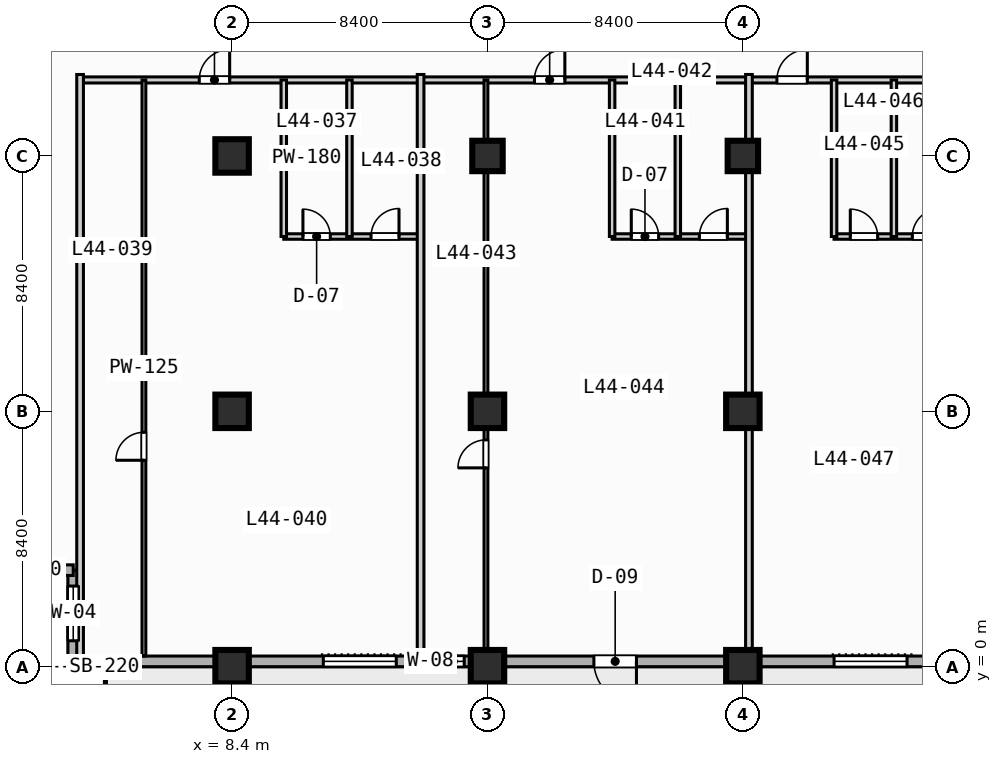
"""IFC4 building model, lengths in metres.
Left out: names, types, materials, properties, quantities, classifications, styles, units other than length and angle.
Written with IfcOpenShell. Run it as: python <this file> out.ifc"""

import sys

from ifc_helpers import new_model, si_unit, direction, frame, frame_2d, origin, origin_2d, place, context, subcontext, project, spatial, rectangle, extrude, element, fill, save


model = new_model("IFC4")
c1 = context("Model", 3, precision=1e-05, world=origin(), true_north=direction((0.0, 1.0)))
c2 = subcontext(c1, "Body", "Model", "MODEL_VIEW")
j1 = project(units=[si_unit("LENGTHUNIT", "METRE"), si_unit("PLANEANGLEUNIT", "RADIAN")], contexts=[c1])
p1 = place(None, origin())
s1 = spatial("IfcSite", under=j1, at=p1, CompositionType="ELEMENT")
p2 = place(p1, origin())
s2 = spatial("IfcBuilding", under=s1, at=p2, CompositionType="ELEMENT")
p3 = place(p2, frame((0.0, 0.0, 182.8)))
s3 = spatial("IfcBuildingStorey", under=s2, at=p3, CompositionType="ELEMENT", Elevation=182.8)
for number, where, z_axis, x_axis in (
    (1, (8.4, 0.0, 0.0), (0.0, 0.0, 1.0), (1.0, 0.0, 0.0)),
    (2, (8.4, 8.4, 0.0), (0.0, 0.0, 1.0), (1.0, 0.0, 0.0)),
    (3, (8.4, 16.8, 0.0), (0.0, 0.0, 1.0), (1.0, 0.0, 0.0)),
    (4, (16.8, 0.0, 0.0), (0.0, 0.0, 1.0), (1.0, 0.0, 0.0)),
    (5, (16.8, 8.4, 0.0), (0.0, 0.0, 1.0), (1.0, 0.0, 0.0)),
):
    element("IfcColumn", number, at=place(p3, frame(where, z_axis=z_axis, x_axis=x_axis)), inside=s3, PredefinedType="COLUMN", context=c2, shape_type="SweptSolid", body=[
        extrude(rectangle(XDim=1.1, YDim=1.1, at=origin_2d()), origin(), (0.0, 0.0, 1.0), 3.7),
    ])
p4 = place(p3, frame((16.8, 16.8, 0.0), z_axis=(0.0, 0.0, 1.0), x_axis=(1.0, 0.0, 0.0)))
e6 = element("IfcColumn", 6, at=p4, inside=s3, PredefinedType="COLUMN", context=c2, shape_type="SweptSolid", body=[
    extrude(rectangle(XDim=1.0, YDim=1.0, at=origin_2d()), origin(), (0.0, 0.0, 1.0), 3.7),
])
for number, where, z_axis, x_axis in (
    (7, (25.2, 0.0, 0.0), (0.0, 0.0, 1.0), (1.0, 0.0, 0.0)),
    (8, (25.2, 8.4, 0.0), (0.0, 0.0, 1.0), (1.0, 0.0, 0.0)),
):
    element("IfcColumn", number, at=place(p3, frame(where, z_axis=z_axis, x_axis=x_axis)), inside=s3, PredefinedType="COLUMN", context=c2, shape_type="SweptSolid", body=[
        extrude(rectangle(XDim=1.1, YDim=1.1, at=origin_2d()), origin(), (0.0, 0.0, 1.0), 3.7),
    ])
p5 = place(p3, frame((25.2, 16.8, 0.0), z_axis=(0.0, 0.0, 1.0), x_axis=(1.0, 0.0, 0.0)))
e9 = element("IfcColumn", 9, at=p5, inside=s3, PredefinedType="COLUMN", context=c2, shape_type="SweptSolid", body=[
    extrude(rectangle(XDim=1.0, YDim=1.0, at=origin_2d()), origin(), (0.0, 0.0, 1.0), 3.7),
])
p6 = place(p3, frame((3.175, 0.175, 0.0), z_axis=(0.0, 0.0, 1.0), x_axis=(0.0, 1.0, 0.0)))
e10 = element("IfcWall", 10, at=p6, inside=s3, PredefinedType="STANDARD", context=c2, shape_type="SweptSolid", body=[
    extrude(rectangle(XDim=3.0, YDim=0.35, at=frame_2d((1.5, 0.0))), origin(), (0.0, 0.0, 1.0), 3.47),
])
p7 = place(p6, frame((0.677, 0.0, 0.85)))
e11 = element("IfcOpeningElement", 11, at=p7, cuts=e10, PredefinedType="OPENING", context=c2, shape_type="SweptSolid", body=[
    extrude(rectangle(XDim=1.8, YDim=1.8, at=frame_2d((0.9, 0.9))), frame((0.0, 0.185, 0.0), z_axis=(0.0, -1.0, 0.0), x_axis=(1.0, 0.0, 0.0)), (0.0, 0.0, 1.0), 0.37),
])
p8 = place(p3, frame((3.175, 3.175, 0.0), z_axis=(0.0, 0.0, 1.0), x_axis=(-1.0, 0.0, 0.0)))
e12 = element("IfcWall", 12, at=p8, inside=s3, PredefinedType="STANDARD", context=c2, shape_type="SweptSolid", body=[
    extrude(rectangle(XDim=3.0, YDim=0.35, at=frame_2d((1.5, 0.0))), origin(), (0.0, 0.0, 1.0), 3.47),
])
p9 = place(p3, frame((72.425, 0.175, 0.0), z_axis=(0.0, 0.0, 1.0), x_axis=(-1.0, 0.0, 0.0)))
e13 = element("IfcWall", 13, at=p9, inside=s3, PredefinedType="STANDARD", context=c2, shape_type="SweptSolid", body=[
    extrude(rectangle(XDim=69.25, YDim=0.35, at=frame_2d((34.625, 0.0))), origin(), (0.0, 0.0, 1.0), 3.47),
])
p10 = place(p9, frame((50.725, 0.0, 0.0)))
e14 = element("IfcOpeningElement", 14, at=p10, cuts=e13, PredefinedType="OPENING", context=c2, shape_type="SweptSolid", body=[
    extrude(rectangle(XDim=1.4, YDim=2.2, at=frame_2d((0.7, 1.1))), frame((0.0, 0.185, 0.0), z_axis=(0.0, -1.0, 0.0), x_axis=(1.0, 0.0, 0.0)), (0.0, 0.0, 1.0), 0.37),
])
p11 = place(p9, frame((58.625, 0.0, 0.85)))
e15 = element("IfcOpeningElement", 15, at=p11, cuts=e13, PredefinedType="OPENING", context=c2, shape_type="SweptSolid", body=[
    extrude(rectangle(XDim=2.4, YDim=1.95, at=frame_2d((1.2, 0.975))), frame((0.0, 0.185, 0.0), z_axis=(0.0, -1.0, 0.0), x_axis=(1.0, 0.0, 0.0)), (0.0, 0.0, 1.0), 0.37),
])
p12 = place(p9, frame((41.825, 0.0, 0.85)))
e16 = element("IfcOpeningElement", 16, at=p12, cuts=e13, PredefinedType="OPENING", context=c2, shape_type="SweptSolid", body=[
    extrude(rectangle(XDim=2.4, YDim=1.95, at=frame_2d((1.2, 0.975))), frame((0.0, 0.185, 0.0), z_axis=(0.0, -1.0, 0.0), x_axis=(1.0, 0.0, 0.0)), (0.0, 0.0, 1.0), 0.37),
])
p13 = place(p9, frame((33.725, 0.0, 0.85)))
e17 = element("IfcOpeningElement", 17, at=p13, cuts=e13, PredefinedType="OPENING", context=c2, shape_type="SweptSolid", body=[
    extrude(rectangle(XDim=1.8, YDim=1.8, at=frame_2d((0.9, 0.9))), frame((0.0, 0.185, 0.0), z_axis=(0.0, -1.0, 0.0), x_axis=(1.0, 0.0, 0.0)), (0.0, 0.0, 1.0), 0.37),
])
p14 = place(p9, frame((25.025, 0.0, 0.85)))
e18 = element("IfcOpeningElement", 18, at=p14, cuts=e13, PredefinedType="OPENING", context=c2, shape_type="SweptSolid", body=[
    extrude(rectangle(XDim=2.4, YDim=1.95, at=frame_2d((1.2, 0.975))), frame((0.0, 0.185, 0.0), z_axis=(0.0, -1.0, 0.0), x_axis=(1.0, 0.0, 0.0)), (0.0, 0.0, 1.0), 0.37),
])
p15 = place(p9, frame((67.075, 0.0, 0.85)))
e19 = element("IfcOpeningElement", 19, at=p15, cuts=e13, PredefinedType="OPENING", context=c2, shape_type="SweptSolid", body=[
    extrude(rectangle(XDim=1.8, YDim=1.8, at=frame_2d((0.9, 0.9))), frame((0.0, 0.185, 0.0), z_axis=(0.0, -1.0, 0.0), x_axis=(1.0, 0.0, 0.0)), (0.0, 0.0, 1.0), 0.37),
])
p16 = place(p9, frame((56.39, 0.0, 0.85)))
e20 = element("IfcOpeningElement", 20, at=p16, cuts=e13, PredefinedType="OPENING", context=c2, shape_type="SweptSolid", body=[
    extrude(rectangle(XDim=0.72, YDim=1.8, at=frame_2d((0.36, 0.9))), frame((0.0, 0.185, 0.0), z_axis=(0.0, -1.0, 0.0), x_axis=(1.0, 0.0, 0.0)), (0.0, 0.0, 1.0), 0.37),
])
p17 = place(p9, frame((9.075, 0.0, 0.85)))
e21 = element("IfcOpeningElement", 21, at=p17, cuts=e13, PredefinedType="OPENING", context=c2, shape_type="SweptSolid", body=[
    extrude(rectangle(XDim=1.8, YDim=1.8, at=frame_2d((0.9, 0.9))), frame((0.0, 0.185, 0.0), z_axis=(0.0, -1.0, 0.0), x_axis=(1.0, 0.0, 0.0)), (0.0, 0.0, 1.0), 0.37),
])
p18 = place(p9, frame((2.675, 0.0, 0.85)))
e22 = element("IfcOpeningElement", 22, at=p18, cuts=e13, PredefinedType="OPENING", context=c2, shape_type="SweptSolid", body=[
    extrude(rectangle(XDim=1.8, YDim=1.8, at=frame_2d((0.9, 0.9))), frame((0.0, 0.185, 0.0), z_axis=(0.0, -1.0, 0.0), x_axis=(1.0, 0.0, 0.0)), (0.0, 0.0, 1.0), 0.37),
])
p19 = place(p3, frame((3.4, 19.3, 0.0), z_axis=(0.0, 0.0, 1.0), x_axis=(1.0, 0.0, 0.0)))
e23 = element("IfcWall", 23, at=p19, inside=s3, PredefinedType="PARTITIONING", context=c2, shape_type="SweptSolid", body=[
    extrude(rectangle(XDim=35.8, YDim=0.2, at=frame_2d((17.9, 0.0))), origin(), (0.0, 0.0, 1.0), 3.47),
])
p20 = place(p19, frame((3.92, 0.0, 0.0)))
e24 = element("IfcOpeningElement", 24, at=p20, cuts=e23, PredefinedType="OPENING", context=c2, shape_type="SweptSolid", body=[
    extrude(rectangle(XDim=1.0, YDim=2.15, at=frame_2d((0.5, 1.075))), frame((0.0, 0.11, 0.0), z_axis=(0.0, -1.0, 0.0), x_axis=(1.0, 0.0, 0.0)), (0.0, 0.0, 1.0), 0.22),
])
p21 = place(p19, frame((14.945, 0.0, 0.0)))
e25 = element("IfcOpeningElement", 25, at=p21, cuts=e23, PredefinedType="OPENING", context=c2, shape_type="SweptSolid", body=[
    extrude(rectangle(XDim=1.0, YDim=2.15, at=frame_2d((0.5, 1.075))), frame((0.0, 0.11, 0.0), z_axis=(0.0, -1.0, 0.0), x_axis=(1.0, 0.0, 0.0)), (0.0, 0.0, 1.0), 0.22),
])
p22 = place(p19, frame((22.92, 0.0, 0.0)))
e26 = element("IfcOpeningElement", 26, at=p22, cuts=e23, PredefinedType="OPENING", context=c2, shape_type="SweptSolid", body=[
    extrude(rectangle(XDim=1.0, YDim=2.15, at=frame_2d((0.5, 1.075))), frame((0.0, 0.11, 0.0), z_axis=(0.0, -1.0, 0.0), x_axis=(1.0, 0.0, 0.0)), (0.0, 0.0, 1.0), 0.22),
])
p23 = place(p19, frame((29.82, 0.0, 0.0)))
e27 = element("IfcOpeningElement", 27, at=p23, cuts=e23, PredefinedType="OPENING", context=c2, shape_type="SweptSolid", body=[
    extrude(rectangle(XDim=1.0, YDim=2.15, at=frame_2d((0.5, 1.075))), frame((0.0, 0.11, 0.0), z_axis=(0.0, -1.0, 0.0), x_axis=(1.0, 0.0, 0.0)), (0.0, 0.0, 1.0), 0.22),
])
p24 = place(p3, frame((3.4, 0.2, 0.0), z_axis=(0.0, 0.0, 1.0), x_axis=(0.0, 1.0, 0.0)))
e28 = element("IfcWall", 28, at=p24, inside=s3, PredefinedType="PARTITIONING", context=c2, shape_type="SweptSolid", body=[
    extrude(rectangle(XDim=19.28, YDim=0.22, at=frame_2d((9.64, 0.0))), origin(), (0.0, 0.0, 1.0), 3.47),
])
p25 = place(p3, frame((10.1, 14.15, 0.0), z_axis=(0.0, 0.0, 1.0), x_axis=(1.0, 0.0, 0.0)))
e29 = element("IfcWall", 29, at=p25, inside=s3, PredefinedType="PLUMBINGWALL", context=c2, shape_type="SweptSolid", body=[
    extrude(rectangle(XDim=4.5, YDim=0.18, at=frame_2d((2.25, 0.0))), origin(), (0.0, 0.0, 1.0), 3.47),
])
p26 = place(p25, frame((0.63, 0.0, 0.0)))
e30 = element("IfcOpeningElement", 30, at=p26, cuts=e29, PredefinedType="OPENING", context=c2, shape_type="SweptSolid", body=[
    extrude(rectangle(XDim=0.9, YDim=2.1, at=frame_2d((0.45, 1.05))), frame((0.0, 0.1, 0.0), z_axis=(0.0, -1.0, 0.0), x_axis=(1.0, 0.0, 0.0)), (0.0, 0.0, 1.0), 0.2),
])
p27 = place(p25, frame((2.87, 0.0, 0.0)))
e31 = element("IfcOpeningElement", 31, at=p27, cuts=e29, PredefinedType="OPENING", context=c2, shape_type="SweptSolid", body=[
    extrude(rectangle(XDim=0.92, YDim=2.1, at=frame_2d((0.46, 1.05))), frame((0.0, 0.1, 0.0), z_axis=(0.0, -1.0, 0.0), x_axis=(1.0, 0.0, 0.0)), (0.0, 0.0, 1.0), 0.2),
])
for number, where, z_axis, x_axis in (
    (32, (10.1, 14.15, 0.0), (0.0, 0.0, 1.0), (0.0, 1.0, 0.0)),
    (33, (12.26, 14.15, 0.0), (0.0, 0.0, 1.0), (0.0, 1.0, 0.0)),
):
    element("IfcWall", number, at=place(p3, frame(where, z_axis=z_axis, x_axis=x_axis)), inside=s3, PredefinedType="PLUMBINGWALL", context=c2, shape_type="SweptSolid", body=[
        extrude(rectangle(XDim=5.15, YDim=0.18, at=frame_2d((2.575, 0.0))), origin(), (0.0, 0.0, 1.0), 3.47),
    ])
p28 = place(p3, frame((5.5, 0.35, 0.0), z_axis=(0.0, 0.0, 1.0), x_axis=(0.0, 1.0, 0.0)))
e34 = element("IfcWall", 34, at=p28, inside=s3, PredefinedType="PARTITIONING", context=c2, shape_type="SweptSolid", body=[
    extrude(rectangle(XDim=18.95, YDim=0.125, at=frame_2d((9.475, 0.0))), origin(), (0.0, 0.0, 1.0), 3.47),
])
p29 = place(p28, frame((6.44, 0.0, 0.0)))
e35 = element("IfcOpeningElement", 35, at=p29, cuts=e34, PredefinedType="OPENING", context=c2, shape_type="SweptSolid", body=[
    extrude(rectangle(XDim=0.92, YDim=2.1, at=frame_2d((0.46, 1.05))), frame((0.0, 0.073, 0.0), z_axis=(0.0, -1.0, 0.0), x_axis=(1.0, 0.0, 0.0)), (0.0, 0.0, 1.0), 0.145),
])
p30 = place(p3, frame((14.6, 0.2, 0.0), z_axis=(0.0, 0.0, 1.0), x_axis=(0.0, 1.0, 0.0)))
e36 = element("IfcWall", 36, at=p30, inside=s3, PredefinedType="PARTITIONING", context=c2, shape_type="SweptSolid", body=[
    extrude(rectangle(XDim=19.28, YDim=0.22, at=frame_2d((9.64, 0.0))), origin(), (0.0, 0.0, 1.0), 3.47),
])
p31 = place(p3, frame((20.9, 14.15, 0.0), z_axis=(0.0, 0.0, 1.0), x_axis=(1.0, 0.0, 0.0)))
e37 = element("IfcWall", 37, at=p31, inside=s3, PredefinedType="PLUMBINGWALL", context=c2, shape_type="SweptSolid", body=[
    extrude(rectangle(XDim=4.5, YDim=0.18, at=frame_2d((2.25, 0.0))), origin(), (0.0, 0.0, 1.0), 3.47),
])
p32 = place(p31, frame((0.63, 0.0, 0.0)))
e38 = element("IfcOpeningElement", 38, at=p32, cuts=e37, PredefinedType="OPENING", context=c2, shape_type="SweptSolid", body=[
    extrude(rectangle(XDim=0.9, YDim=2.1, at=frame_2d((0.45, 1.05))), frame((0.0, 0.1, 0.0), z_axis=(0.0, -1.0, 0.0), x_axis=(1.0, 0.0, 0.0)), (0.0, 0.0, 1.0), 0.2),
])
p33 = place(p31, frame((2.87, 0.0, 0.0)))
e39 = element("IfcOpeningElement", 39, at=p33, cuts=e37, PredefinedType="OPENING", context=c2, shape_type="SweptSolid", body=[
    extrude(rectangle(XDim=0.92, YDim=2.1, at=frame_2d((0.46, 1.05))), frame((0.0, 0.1, 0.0), z_axis=(0.0, -1.0, 0.0), x_axis=(1.0, 0.0, 0.0)), (0.0, 0.0, 1.0), 0.2),
])
for number, where, z_axis, x_axis in (
    (40, (20.9, 14.15, 0.0), (0.0, 0.0, 1.0), (0.0, 1.0, 0.0)),
    (41, (23.06, 14.15, 0.0), (0.0, 0.0, 1.0), (0.0, 1.0, 0.0)),
):
    element("IfcWall", number, at=place(p3, frame(where, z_axis=z_axis, x_axis=x_axis)), inside=s3, PredefinedType="PLUMBINGWALL", context=c2, shape_type="SweptSolid", body=[
        extrude(rectangle(XDim=5.15, YDim=0.18, at=frame_2d((2.575, 0.0))), origin(), (0.0, 0.0, 1.0), 3.47),
    ])
p34 = place(p3, frame((16.75, 0.35, 0.0), z_axis=(0.0, 0.0, 1.0), x_axis=(0.0, 1.0, 0.0)))
e42 = element("IfcWall", 42, at=p34, inside=s3, PredefinedType="PARTITIONING", context=c2, shape_type="SweptSolid", body=[
    extrude(rectangle(XDim=18.95, YDim=0.125, at=frame_2d((9.475, 0.0))), origin(), (0.0, 0.0, 1.0), 2.82),
])
p35 = place(p34, frame((6.19, 0.0, 0.0)))
e43 = element("IfcOpeningElement", 43, at=p35, cuts=e42, PredefinedType="OPENING", context=c2, shape_type="SweptSolid", body=[
    extrude(rectangle(XDim=0.92, YDim=2.1, at=frame_2d((0.46, 1.05))), frame((0.0, 0.073, 0.0), z_axis=(0.0, -1.0, 0.0), x_axis=(1.0, 0.0, 0.0)), (0.0, 0.0, 1.0), 0.145),
])
p36 = place(p3, frame((25.4, 0.2, 0.0), z_axis=(0.0, 0.0, 1.0), x_axis=(0.0, 1.0, 0.0)))
e44 = element("IfcWall", 44, at=p36, inside=s3, PredefinedType="PARTITIONING", context=c2, shape_type="SweptSolid", body=[
    extrude(rectangle(XDim=19.28, YDim=0.22, at=frame_2d((9.64, 0.0))), origin(), (0.0, 0.0, 1.0), 2.82),
])
p37 = place(p3, frame((28.2, 14.15, 0.0), z_axis=(0.0, 0.0, 1.0), x_axis=(1.0, 0.0, 0.0)))
e45 = element("IfcWall", 45, at=p37, inside=s3, PredefinedType="PLUMBINGWALL", context=c2, shape_type="SweptSolid", body=[
    extrude(rectangle(XDim=4.1, YDim=0.18, at=frame_2d((2.05, 0.0))), origin(), (0.0, 0.0, 1.0), 3.47),
])
p38 = place(p37, frame((0.534, 0.0, 0.0)))
e46 = element("IfcOpeningElement", 46, at=p38, cuts=e45, PredefinedType="OPENING", context=c2, shape_type="SweptSolid", body=[
    extrude(rectangle(XDim=0.9, YDim=2.1, at=frame_2d((0.45, 1.05))), frame((0.0, 0.1, 0.0), z_axis=(0.0, -1.0, 0.0), x_axis=(1.0, 0.0, 0.0)), (0.0, 0.0, 1.0), 0.2),
])
p39 = place(p37, frame((2.574, 0.0, 0.0)))
e47 = element("IfcOpeningElement", 47, at=p39, cuts=e45, PredefinedType="OPENING", context=c2, shape_type="SweptSolid", body=[
    extrude(rectangle(XDim=0.92, YDim=2.1, at=frame_2d((0.46, 1.05))), frame((0.0, 0.1, 0.0), z_axis=(0.0, -1.0, 0.0), x_axis=(1.0, 0.0, 0.0)), (0.0, 0.0, 1.0), 0.2),
])
for number, where, z_axis, x_axis in (
    (48, (28.2, 14.15, 0.0), (0.0, 0.0, 1.0), (0.0, 1.0, 0.0)),
    (49, (30.168, 14.15, 0.0), (0.0, 0.0, 1.0), (0.0, 1.0, 0.0)),
):
    element("IfcWall", number, at=place(p3, frame(where, z_axis=z_axis, x_axis=x_axis)), inside=s3, PredefinedType="PLUMBINGWALL", context=c2, shape_type="SweptSolid", body=[
        extrude(rectangle(XDim=5.15, YDim=0.18, at=frame_2d((2.575, 0.0))), origin(), (0.0, 0.0, 1.0), 3.47),
    ])
p40 = place(p7, origin())
e50 = element("IfcWindow", 50, at=p40, inside=s3, PartitioningType="SINGLE_PANEL", PredefinedType="WINDOW", context=c2, shape_type="SweptSolid", body=[
    extrude(rectangle(XDim=1.8, YDim=1.8, at=frame_2d((0.9, 0.9))), frame((0.0, 0.03, 0.0), z_axis=(0.0, -1.0, 0.0), x_axis=(1.0, 0.0, 0.0)), (0.0, 0.0, 1.0), 0.06),
])
fill(e11, e50)
p41 = place(p10, origin())
e51 = element("IfcDoor", 51, at=p41, inside=s3, OperationType="SINGLE_SWING_LEFT", PredefinedType="DOOR", context=c2, shape_type="SweptSolid", body=[
    extrude(rectangle(XDim=1.4, YDim=2.2, at=frame_2d((0.7, 1.1))), frame((0.0, 0.025, 0.0), z_axis=(0.0, -1.0, 0.0), x_axis=(1.0, 0.0, 0.0)), (0.0, 0.0, 1.0), 0.05),
])
fill(e14, e51)
p42 = place(p11, origin())
e52 = element("IfcWindow", 52, at=p42, inside=s3, PartitioningType="SINGLE_PANEL", PredefinedType="WINDOW", context=c2, shape_type="SweptSolid", body=[
    extrude(rectangle(XDim=2.4, YDim=1.95, at=frame_2d((1.2, 0.975))), frame((0.0, 0.03, 0.0), z_axis=(0.0, -1.0, 0.0), x_axis=(1.0, 0.0, 0.0)), (0.0, 0.0, 1.0), 0.06),
])
fill(e15, e52)
p43 = place(p12, origin())
e53 = element("IfcWindow", 53, at=p43, inside=s3, PartitioningType="SINGLE_PANEL", PredefinedType="WINDOW", context=c2, shape_type="SweptSolid", body=[
    extrude(rectangle(XDim=2.4, YDim=1.95, at=frame_2d((1.2, 0.975))), frame((0.0, 0.03, 0.0), z_axis=(0.0, -1.0, 0.0), x_axis=(1.0, 0.0, 0.0)), (0.0, 0.0, 1.0), 0.06),
])
fill(e16, e53)
p44 = place(p15, origin())
e54 = element("IfcWindow", 54, at=p44, inside=s3, PartitioningType="SINGLE_PANEL", PredefinedType="WINDOW", context=c2, shape_type="SweptSolid", body=[
    extrude(rectangle(XDim=1.8, YDim=1.8, at=frame_2d((0.9, 0.9))), frame((0.0, 0.03, 0.0), z_axis=(0.0, -1.0, 0.0), x_axis=(1.0, 0.0, 0.0)), (0.0, 0.0, 1.0), 0.06),
])
fill(e19, e54)
p45 = place(p16, origin())
e55 = element("IfcWindow", 55, at=p45, inside=s3, PartitioningType="SINGLE_PANEL", PredefinedType="WINDOW", context=c2, shape_type="SweptSolid", body=[
    extrude(rectangle(XDim=0.72, YDim=1.8, at=frame_2d((0.36, 0.9))), frame((0.0, 0.03, 0.0), z_axis=(0.0, -1.0, 0.0), x_axis=(1.0, 0.0, 0.0)), (0.0, 0.0, 1.0), 0.06),
])
fill(e20, e55)
p46 = place(p20, origin())
e56 = element("IfcDoor", 56, at=p46, inside=s3, OperationType="SINGLE_SWING_RIGHT", PredefinedType="DOOR", context=c2, shape_type="SweptSolid", body=[
    extrude(rectangle(XDim=1.0, YDim=2.15, at=frame_2d((0.5, 1.075))), frame((0.0, 0.025, 0.0), z_axis=(0.0, -1.0, 0.0), x_axis=(1.0, 0.0, 0.0)), (0.0, 0.0, 1.0), 0.05),
])
fill(e24, e56)
p47 = place(p21, origin())
e57 = element("IfcDoor", 57, at=p47, inside=s3, OperationType="SINGLE_SWING_RIGHT", PredefinedType="DOOR", context=c2, shape_type="SweptSolid", body=[
    extrude(rectangle(XDim=1.0, YDim=2.15, at=frame_2d((0.5, 1.075))), frame((0.0, 0.025, 0.0), z_axis=(0.0, -1.0, 0.0), x_axis=(1.0, 0.0, 0.0)), (0.0, 0.0, 1.0), 0.05),
])
fill(e25, e57)
p48 = place(p22, origin())
e58 = element("IfcDoor", 58, at=p48, inside=s3, OperationType="SINGLE_SWING_RIGHT", PredefinedType="DOOR", context=c2, shape_type="SweptSolid", body=[
    extrude(rectangle(XDim=1.0, YDim=2.15, at=frame_2d((0.5, 1.075))), frame((0.0, 0.025, 0.0), z_axis=(0.0, -1.0, 0.0), x_axis=(1.0, 0.0, 0.0)), (0.0, 0.0, 1.0), 0.05),
])
fill(e26, e58)
p49 = place(p26, origin())
e59 = element("IfcDoor", 59, at=p49, inside=s3, OperationType="SINGLE_SWING_LEFT", PredefinedType="DOOR", context=c2, shape_type="SweptSolid", body=[
    extrude(rectangle(XDim=0.9, YDim=2.1, at=frame_2d((0.45, 1.05))), frame((0.0, 0.025, 0.0), z_axis=(0.0, -1.0, 0.0), x_axis=(1.0, 0.0, 0.0)), (0.0, 0.0, 1.0), 0.05),
])
fill(e30, e59)
p50 = place(p27, origin())
e60 = element("IfcDoor", 60, at=p50, inside=s3, OperationType="SINGLE_SWING_RIGHT", PredefinedType="DOOR", context=c2, shape_type="SweptSolid", body=[
    extrude(rectangle(XDim=0.92, YDim=2.1, at=frame_2d((0.46, 1.05))), frame((0.0, 0.025, 0.0), z_axis=(0.0, -1.0, 0.0), x_axis=(1.0, 0.0, 0.0)), (0.0, 0.0, 1.0), 0.05),
])
fill(e31, e60)
p51 = place(p29, origin())
e61 = element("IfcDoor", 61, at=p51, inside=s3, OperationType="SINGLE_SWING_LEFT", PredefinedType="DOOR", context=c2, shape_type="SweptSolid", body=[
    extrude(rectangle(XDim=0.92, YDim=2.1, at=frame_2d((0.46, 1.05))), frame((0.0, 0.025, 0.0), z_axis=(0.0, -1.0, 0.0), x_axis=(1.0, 0.0, 0.0)), (0.0, 0.0, 1.0), 0.05),
])
fill(e35, e61)
p52 = place(p32, origin())
e62 = element("IfcDoor", 62, at=p52, inside=s3, OperationType="SINGLE_SWING_LEFT", PredefinedType="DOOR", context=c2, shape_type="SweptSolid", body=[
    extrude(rectangle(XDim=0.9, YDim=2.1, at=frame_2d((0.45, 1.05))), frame((0.0, 0.025, 0.0), z_axis=(0.0, -1.0, 0.0), x_axis=(1.0, 0.0, 0.0)), (0.0, 0.0, 1.0), 0.05),
])
fill(e38, e62)
p53 = place(p33, origin())
e63 = element("IfcDoor", 63, at=p53, inside=s3, OperationType="SINGLE_SWING_RIGHT", PredefinedType="DOOR", context=c2, shape_type="SweptSolid", body=[
    extrude(rectangle(XDim=0.92, YDim=2.1, at=frame_2d((0.46, 1.05))), frame((0.0, 0.025, 0.0), z_axis=(0.0, -1.0, 0.0), x_axis=(1.0, 0.0, 0.0)), (0.0, 0.0, 1.0), 0.05),
])
fill(e39, e63)
p54 = place(p35, origin())
e64 = element("IfcDoor", 64, at=p54, inside=s3, OperationType="SINGLE_SWING_LEFT", PredefinedType="DOOR", context=c2, shape_type="SweptSolid", body=[
    extrude(rectangle(XDim=0.92, YDim=2.1, at=frame_2d((0.46, 1.05))), frame((0.0, 0.025, 0.0), z_axis=(0.0, -1.0, 0.0), x_axis=(1.0, 0.0, 0.0)), (0.0, 0.0, 1.0), 0.05),
])
fill(e43, e64)
p55 = place(p38, origin())
e65 = element("IfcDoor", 65, at=p55, inside=s3, OperationType="SINGLE_SWING_LEFT", PredefinedType="DOOR", context=c2, shape_type="SweptSolid", body=[
    extrude(rectangle(XDim=0.9, YDim=2.1, at=frame_2d((0.45, 1.05))), frame((0.0, 0.025, 0.0), z_axis=(0.0, -1.0, 0.0), x_axis=(1.0, 0.0, 0.0)), (0.0, 0.0, 1.0), 0.05),
])
fill(e46, e65)
p56 = place(p39, origin())
e66 = element("IfcDoor", 66, at=p56, inside=s3, OperationType="SINGLE_SWING_RIGHT", PredefinedType="DOOR", context=c2, shape_type="SweptSolid", body=[
    extrude(rectangle(XDim=0.92, YDim=2.1, at=frame_2d((0.46, 1.05))), frame((0.0, 0.025, 0.0), z_axis=(0.0, -1.0, 0.0), x_axis=(1.0, 0.0, 0.0)), (0.0, 0.0, 1.0), 0.05),
])
fill(e47, e66)
save(model, sys.argv[1])
